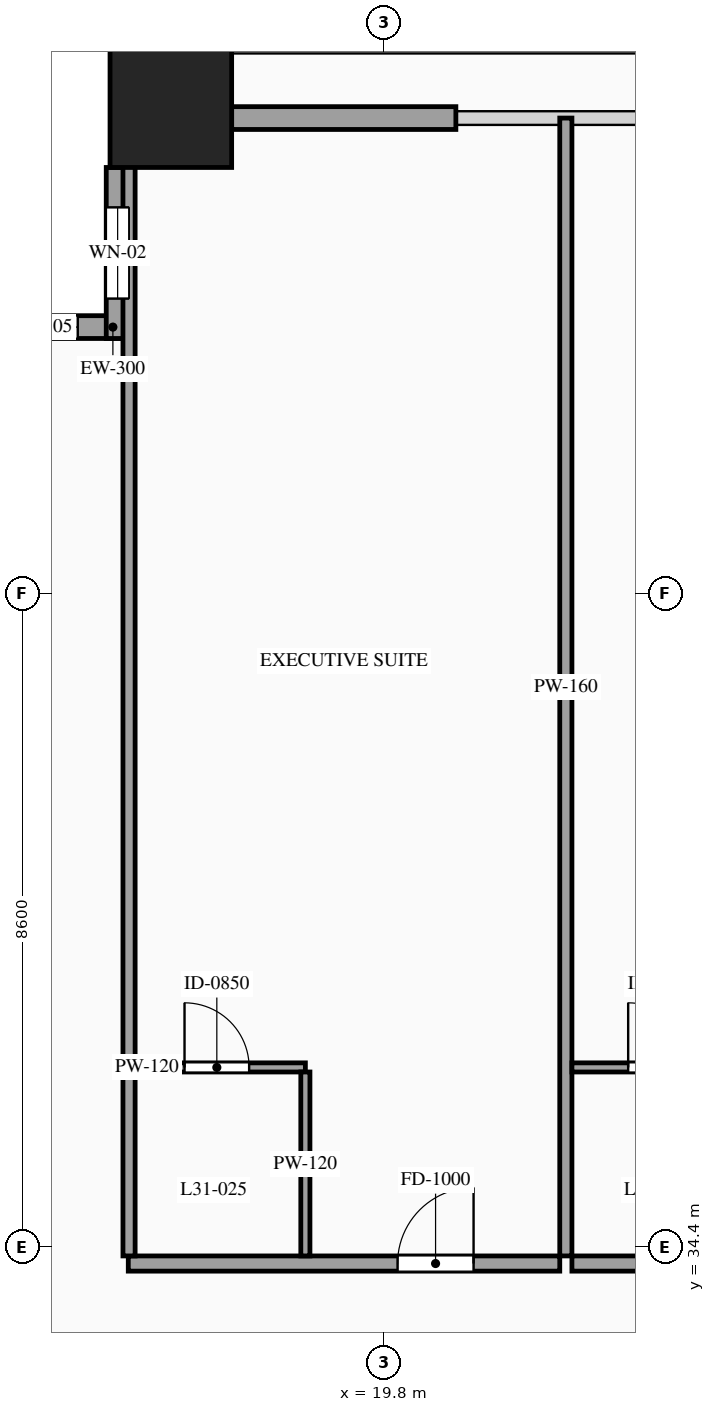
"""IFC4 building model, lengths in metres.
Left out: names, types, materials, properties, quantities, classifications, styles, units other than length and angle.
Written with IfcOpenShell. Run it as: python <this file> out.ifc"""

import sys

from ifc_helpers import new_model, si_unit, direction, frame, frame_2d, origin, origin_2d, place, context, subcontext, project, spatial, rectangle, hollow_rectangle, extrude, source, transform, mapped, element, fill, save


model = new_model("IFC4")
c1 = context("Model", 3, precision=1e-05, world=origin(), true_north=direction((0.0, 1.0)))
c2 = subcontext(c1, "Body", "Model", "MODEL_VIEW")
j1 = project(units=[si_unit("LENGTHUNIT", "METRE"), si_unit("PLANEANGLEUNIT", "RADIAN")], contexts=[c1])
p1 = place(None, origin())
s1 = spatial("IfcSite", under=j1, at=p1, CompositionType="ELEMENT")
p2 = place(p1, origin())
s2 = spatial("IfcBuilding", under=s1, at=p2, CompositionType="ELEMENT")
p3 = place(p2, frame((0.0, 0.0, 119.0)))
s3 = spatial("IfcBuildingStorey", under=s2, at=p3, CompositionType="ELEMENT", Elevation=119.0)
m1 = source(origin(), c2, "Body", "SweptSolid", [
    extrude(hollow_rectangle(XDim=1.6, YDim=1.6, WallThickness=0.07, at=origin_2d()), origin(), (0.0, 0.0, 1.0), 3.6),
])
p4 = place(p3, frame((17.0, 49.4, 0.0), z_axis=(0.0, 0.0, 1.0), x_axis=(1.0, 0.0, 0.0)))
e1 = element("IfcColumn", 1, at=p4, inside=s3, PredefinedType="COLUMN", context=c2, shape_type="MappedRepresentation", body=[
    mapped(m1, transform((0.0, 0.0, 0.0), scale=1.0)),
])
p5 = place(p3, frame((16.45, 46.5, 0.0), z_axis=(0.0, 0.0, 1.0), x_axis=(-1.0, 0.0, 0.0)))
e2 = element("IfcWall", 2, at=p5, inside=s3, PredefinedType="SOLIDWALL", context=c2, shape_type="SweptSolid", body=[
    extrude(rectangle(XDim=2.25, YDim=0.3, at=frame_2d((1.125, 0.0))), origin(), (0.0, 0.0, 1.0), 3.38),
])
p6 = place(p5, frame((0.675, 0.0, 0.85)))
e3 = element("IfcOpeningElement", 3, at=p6, cuts=e2, PredefinedType="OPENING", context=c2, shape_type="SweptSolid", body=[
    extrude(rectangle(XDim=0.9, YDim=1.5, at=frame_2d((0.45, 0.75))), frame((0.0, 0.165, 0.0), z_axis=(0.0, -1.0, 0.0), x_axis=(1.0, 0.0, 0.0)), (0.0, 0.0, 1.0), 0.33),
])
p7 = place(p3, frame((16.3, 48.6, 0.0), z_axis=(0.0, 0.0, 1.0), x_axis=(0.0, -1.0, 0.0)))
e4 = element("IfcWall", 4, at=p7, inside=s3, PredefinedType="SOLIDWALL", context=c2, shape_type="SweptSolid", body=[
    extrude(rectangle(XDim=2.25, YDim=0.3, at=frame_2d((1.125, 0.0))), origin(), (0.0, 0.0, 1.0), 3.38),
])
p8 = place(p7, frame((0.525, 0.0, 0.85)))
e5 = element("IfcOpeningElement", 5, at=p8, cuts=e4, PredefinedType="OPENING", context=c2, shape_type="SweptSolid", body=[
    extrude(rectangle(XDim=1.2, YDim=2.1, at=frame_2d((0.6, 1.05))), frame((0.0, 0.165, 0.0), z_axis=(0.0, -1.0, 0.0), x_axis=(1.0, 0.0, 0.0)), (0.0, 0.0, 1.0), 0.33),
])
m2 = source(origin(), c2, "Body", "SweptSolid", [
    extrude(rectangle(XDim=2.95, YDim=0.3, at=frame_2d((1.475, 0.0))), origin(), (0.0, 0.0, 1.0), 2.775),
])
p9 = place(p3, frame((17.8, 49.25, 0.0), z_axis=(0.0, 0.0, 1.0), x_axis=(1.0, 0.0, 0.0)))
e6 = element("IfcWall", 6, at=p9, inside=s3, PredefinedType="SOLIDWALL", context=c2, shape_type="MappedRepresentation", body=[
    mapped(m2, transform((0.0, 0.0, 0.0), scale=1.0)),
])
p10 = place(p3, frame((16.44, 34.18, 0.0), z_axis=(0.0, 0.0, 1.0), x_axis=(1.0, 0.0, 0.0)))
e7 = element("IfcWall", 7, at=p10, inside=s3, PredefinedType="PARTITIONING", context=c2, shape_type="SweptSolid", body=[
    extrude(rectangle(XDim=5.677, YDim=0.2, at=frame_2d((2.838, 0.0))), origin(), (0.0, 0.0, 1.0), 3.38),
])
p11 = place(p10, frame((3.543, 0.0, 0.0)))
e8 = element("IfcOpeningElement", 8, at=p11, cuts=e7, PredefinedType="OPENING", context=c2, shape_type="SweptSolid", body=[
    extrude(rectangle(XDim=1.0, YDim=2.2, at=frame_2d((0.5, 1.1))), frame((0.0, 0.115, 0.0), z_axis=(0.0, -1.0, 0.0), x_axis=(1.0, 0.0, 0.0)), (0.0, 0.0, 1.0), 0.23),
])
m3 = source(origin(), c2, "Body", "SweptSolid", [
    extrude(rectangle(XDim=14.97, YDim=0.16, at=frame_2d((7.485, 0.0))), origin(), (0.0, 0.0, 1.0), 3.38),
])
p12 = place(p3, frame((22.197, 34.28, 0.0), z_axis=(0.0, 0.0, 1.0), x_axis=(0.0, 1.0, 0.0)))
e9 = element("IfcWall", 9, at=p12, inside=s3, PredefinedType="PARTITIONING", context=c2, shape_type="MappedRepresentation", body=[
    mapped(m3, transform((0.0, 0.0, 0.0), scale=1.0)),
])
p13 = place(p3, frame((16.44, 36.76, 0.0), z_axis=(0.0, 0.0, 1.0), x_axis=(1.0, 0.0, 0.0)))
e10 = element("IfcWall", 10, at=p13, inside=s3, PredefinedType="PARTITIONING", context=c2, shape_type="SweptSolid", body=[
    extrude(rectangle(XDim=2.33, YDim=0.12, at=frame_2d((1.165, 0.0))), origin(), (0.0, 0.0, 1.0), 3.38),
])
p14 = place(p13, frame((0.74, 0.0, 0.0)))
e11 = element("IfcOpeningElement", 11, at=p14, cuts=e10, PredefinedType="OPENING", context=c2, shape_type="SweptSolid", body=[
    extrude(rectangle(XDim=0.85, YDim=2.1, at=frame_2d((0.425, 1.05))), frame((0.0, 0.075, 0.0), z_axis=(0.0, -1.0, 0.0), x_axis=(1.0, 0.0, 0.0)), (0.0, 0.0, 1.0), 0.15),
])
m4 = source(origin(), c2, "Body", "SweptSolid", [
    extrude(rectangle(XDim=2.42, YDim=0.12, at=frame_2d((1.21, 0.0))), origin(), (0.0, 0.0, 1.0), 3.38),
])
p15 = place(p3, frame((18.77, 34.28, 0.0), z_axis=(0.0, 0.0, 1.0), x_axis=(0.0, 1.0, 0.0)))
e12 = element("IfcWall", 12, at=p15, inside=s3, PredefinedType="PARTITIONING", context=c2, shape_type="MappedRepresentation", body=[
    mapped(m4, transform((0.0, 0.0, 0.0), scale=1.0)),
])
p16 = place(p3, frame((22.277, 34.18, 0.0), z_axis=(0.0, 0.0, 1.0), x_axis=(1.0, 0.0, 0.0)))
e13 = element("IfcWall", 13, at=p16, inside=s3, PredefinedType="PARTITIONING", context=c2, shape_type="SweptSolid", body=[
    extrude(rectangle(XDim=9.023, YDim=0.2, at=frame_2d((4.511, 0.0))), origin(), (0.0, 0.0, 1.0), 3.38),
])
p17 = place(p16, frame((5.217, 0.0, 0.0)))
e14 = element("IfcOpeningElement", 14, at=p17, cuts=e13, PredefinedType="OPENING", context=c2, shape_type="SweptSolid", body=[
    extrude(rectangle(XDim=1.0, YDim=2.2, at=frame_2d((0.5, 1.1))), frame((0.0, 0.115, 0.0), z_axis=(0.0, -1.0, 0.0), x_axis=(1.0, 0.0, 0.0)), (0.0, 0.0, 1.0), 0.23),
])
p18 = place(p3, frame((22.277, 36.76, 0.0), z_axis=(0.0, 0.0, 1.0), x_axis=(1.0, 0.0, 0.0)))
e15 = element("IfcWall", 15, at=p18, inside=s3, PredefinedType="PARTITIONING", context=c2, shape_type="SweptSolid", body=[
    extrude(rectangle(XDim=2.33, YDim=0.12, at=frame_2d((1.165, 0.0))), origin(), (0.0, 0.0, 1.0), 3.38),
])
p19 = place(p18, frame((0.74, 0.0, 0.0)))
e16 = element("IfcOpeningElement", 16, at=p19, cuts=e15, PredefinedType="OPENING", context=c2, shape_type="SweptSolid", body=[
    extrude(rectangle(XDim=0.85, YDim=2.1, at=frame_2d((0.425, 1.05))), frame((0.0, 0.075, 0.0), z_axis=(0.0, -1.0, 0.0), x_axis=(1.0, 0.0, 0.0)), (0.0, 0.0, 1.0), 0.15),
])
m5 = source(origin(), c2, "Body", "SweptSolid", [
    extrude(rectangle(XDim=14.82, YDim=0.16, at=frame_2d((7.41, 0.0))), origin(), (0.0, 0.0, 1.0), 3.38),
])
p20 = place(p3, frame((16.45, 34.28, 0.0), z_axis=(0.0, 0.0, 1.0), x_axis=(0.0, 1.0, 0.0)))
e17 = element("IfcWall", 17, at=p20, inside=s3, PredefinedType="PARTITIONING", context=c2, shape_type="MappedRepresentation", body=[
    mapped(m5, transform((0.0, 0.0, 0.0), scale=1.0)),
])
m6 = source(origin(), c2, "Body", "SweptSolid", [
    extrude(rectangle(XDim=0.9, YDim=1.5, at=frame_2d((0.45, 0.75))), frame((0.0, 0.03, 0.0), z_axis=(0.0, -1.0, 0.0), x_axis=(1.0, 0.0, 0.0)), (0.0, 0.0, 1.0), 0.06),
])
p21 = place(p6, origin())
e18 = element("IfcWindow", 18, at=p21, inside=s3, PartitioningType="SINGLE_PANEL", PredefinedType="WINDOW", context=c2, shape_type="MappedRepresentation", body=[
    mapped(m6, transform((0.0, 0.0, 0.0), scale=1.0)),
])
fill(e3, e18)
m7 = source(origin(), c2, "Body", "SweptSolid", [
    extrude(rectangle(XDim=1.2, YDim=2.1, at=frame_2d((0.6, 1.05))), frame((0.0, 0.03, 0.0), z_axis=(0.0, -1.0, 0.0), x_axis=(1.0, 0.0, 0.0)), (0.0, 0.0, 1.0), 0.06),
])
p22 = place(p8, origin())
e19 = element("IfcWindow", 19, at=p22, inside=s3, PartitioningType="SINGLE_PANEL", PredefinedType="WINDOW", context=c2, shape_type="MappedRepresentation", body=[
    mapped(m7, transform((0.0, 0.0, 0.0), scale=1.0)),
])
fill(e5, e19)
m8 = source(origin(), c2, "Body", "SweptSolid", [
    extrude(rectangle(XDim=1.0, YDim=2.2, at=frame_2d((0.5, 1.1))), frame((0.0, 0.025, 0.0), z_axis=(0.0, -1.0, 0.0), x_axis=(1.0, 0.0, 0.0)), (0.0, 0.0, 1.0), 0.05),
])
p23 = place(p11, origin())
e20 = element("IfcDoor", 20, at=p23, inside=s3, OperationType="SINGLE_SWING_RIGHT", PredefinedType="DOOR", context=c2, shape_type="MappedRepresentation", body=[
    mapped(m8, transform((0.0, 0.0, 0.0), scale=1.0)),
])
fill(e8, e20)
m9 = source(origin(), c2, "Body", "SweptSolid", [
    extrude(rectangle(XDim=0.85, YDim=2.1, at=frame_2d((0.425, 1.05))), frame((0.0, 0.025, 0.0), z_axis=(0.0, -1.0, 0.0), x_axis=(1.0, 0.0, 0.0)), (0.0, 0.0, 1.0), 0.05),
])
p24 = place(p14, origin())
e21 = element("IfcDoor", 21, at=p24, inside=s3, OperationType="SINGLE_SWING_LEFT", PredefinedType="DOOR", context=c2, shape_type="MappedRepresentation", body=[
    mapped(m9, transform((0.0, 0.0, 0.0), scale=1.0)),
])
fill(e11, e21)
p25 = place(p19, origin())
e22 = element("IfcDoor", 22, at=p25, inside=s3, OperationType="SINGLE_SWING_LEFT", PredefinedType="DOOR", context=c2, shape_type="MappedRepresentation", body=[
    mapped(m9, transform((0.0, 0.0, 0.0), scale=1.0)),
])
fill(e16, e22)
save(model, sys.argv[1])
